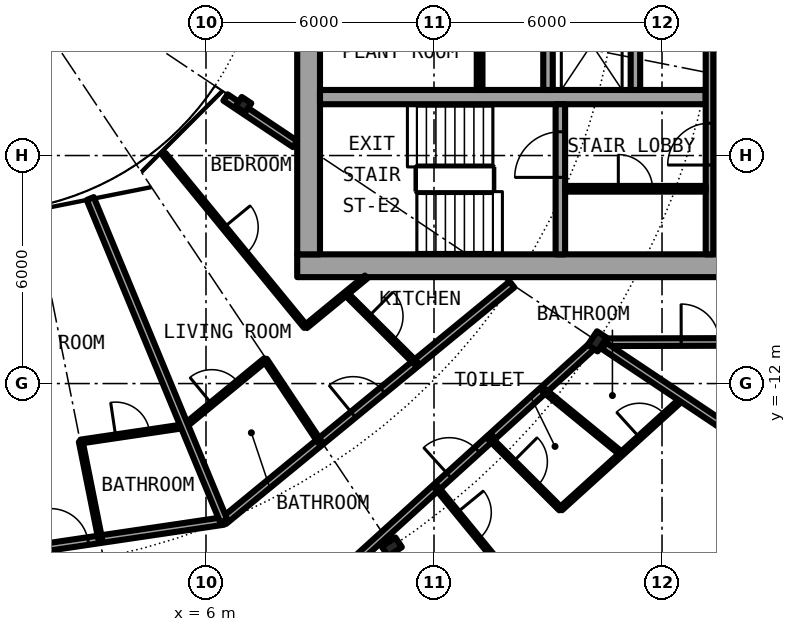
"""IFC4 building model, lengths in metres.
Left out: names, types, materials, properties, quantities, classifications, styles, units other than length and angle.
Written with IfcOpenShell. Run it as: python <this file> out.ifc"""

import sys

from ifc_helpers import new_model, si_unit, direction, frame, frame_2d, origin, origin_2d, place, context, subcontext, project, spatial, rectangle, i_section, extrude, element, fill, save


model = new_model("IFC4")
c1 = context("Model", 3, precision=1e-05, world=origin(), true_north=direction((0.0, 1.0)))
c2 = subcontext(c1, "Body", "Model", "MODEL_VIEW")
j1 = project(units=[si_unit("LENGTHUNIT", "METRE"), si_unit("PLANEANGLEUNIT", "RADIAN")], contexts=[c1])
p1 = place(None, origin())
s1 = spatial("IfcSite", under=j1, at=p1, CompositionType="ELEMENT")
p2 = place(p1, origin())
s2 = spatial("IfcBuilding", under=s1, at=p2, CompositionType="ELEMENT")
p3 = place(p2, frame((0.0, 0.0, 129.95)))
s3 = spatial("IfcBuildingStorey", under=s2, at=p3, CompositionType="ELEMENT", Elevation=129.95)
for number, where, z_axis, x_axis in (
    (1, (10.889, -16.297, 0.0), (0.0, 0.0, 1.0), (0.556, -0.831, 0.0)),
    (2, (16.297, -10.889, 0.0), (0.0, 0.0, 1.0), (0.831, -0.556, 0.0)),
):
    element("IfcColumn", number, at=place(p3, frame(where, z_axis=z_axis, x_axis=x_axis)), inside=s3, PredefinedType="COLUMN", context=c2, shape_type="SweptSolid", body=[
        extrude(i_section(OverallWidth=0.307, OverallDepth=0.432, WebThickness=0.021, FlangeThickness=0.04, FilletRadius=0.027, at=origin_2d()), origin(), (0.0, 0.0, 1.0), 3.05),
    ])
p4 = place(p3, frame((6.984, -4.667, 0.0), z_axis=(0.0, 0.0, 1.0), x_axis=(0.831469612303, -0.55557023302, 0.0)))
e3 = element("IfcColumn", 3, at=p4, inside=s3, PredefinedType="COLUMN", context=c2, shape_type="SweptSolid", body=[
    extrude(i_section(OverallWidth=0.3, OverallDepth=0.3, WebThickness=0.011, FlangeThickness=0.019, FilletRadius=0.027, at=origin_2d()), origin(), (0.0, 0.0, 1.0), 3.05),
])
p5 = place(p3, frame((19.304, -19.304, 0.0), z_axis=(0.0, 0.0, 1.0), x_axis=(0.634382322723, 0.773019449054, 0.0)))
e4 = element("IfcWall", 4, at=p5, inside=s3, PredefinedType="SOLIDWALL", context=c2, shape_type="SweptSolid", body=[
    extrude(rectangle(XDim=5.352, YDim=0.25, at=frame_2d((2.676, 0.0))), origin(), (0.0, 0.0, 1.0), 2.7),
])
p6 = place(p5, frame((0.441, 0.0, 0.3)))
e5 = element("IfcOpeningElement", 5, at=p6, cuts=e4, PredefinedType="OPENING", context=c2, shape_type="SweptSolid", body=[
    extrude(rectangle(XDim=1.8, YDim=2.1, at=frame_2d((0.9, 1.05))), frame((0.0, 0.135, 0.0), z_axis=(0.0, -1.0, 0.0), x_axis=(1.0, 0.0, 0.0)), (0.0, 0.0, 1.0), 0.27),
])
p7 = place(p5, frame((3.51, 0.0, 0.0)))
e6 = element("IfcOpeningElement", 6, at=p7, cuts=e4, PredefinedType="OPENING", context=c2, shape_type="SweptSolid", body=[
    extrude(rectangle(XDim=1.0, YDim=2.2, at=frame_2d((0.5, 1.1))), frame((0.0, 0.135, 0.0), z_axis=(0.0, -1.0, 0.0), x_axis=(1.0, 0.0, 0.0)), (0.0, 0.0, 1.0), 0.27),
])
p8 = place(p3, frame((8.4, -8.9, 0.0), z_axis=(0.0, 0.0, 1.0), x_axis=(1.0, 0.0, 0.0)))
e7 = element("IfcWall", 7, at=p8, inside=s3, PredefinedType="SHEAR", context=c2, shape_type="SweptSolid", body=[
    extrude(rectangle(XDim=13.8, YDim=0.6, at=frame_2d((6.9, 0.0))), origin(), (0.0, 0.0, 1.0), 3.05),
])
p9 = place(p8, frame((11.475, 0.0, 0.0)))
e8 = element("IfcOpeningElement", 8, at=p9, cuts=e7, PredefinedType="OPENING", context=c2, shape_type="SweptSolid", body=[
    extrude(rectangle(XDim=1.2, YDim=2.3, at=frame_2d((0.6, 1.15))), frame((0.0, 0.31, 0.0), z_axis=(0.0, -1.0, 0.0), x_axis=(1.0, 0.0, 0.0)), (0.0, 0.0, 1.0), 0.62),
])
p10 = place(p3, frame((8.7, -8.6, 0.0), z_axis=(0.0, 0.0, 1.0), x_axis=(0.0, 1.0, 0.0)))
e9 = element("IfcWall", 9, at=p10, inside=s3, PredefinedType="SHEAR", context=c2, shape_type="SweptSolid", body=[
    extrude(rectangle(XDim=17.2, YDim=0.6, at=frame_2d((8.6, 0.0))), origin(), (0.0, 0.0, 1.0), 3.05),
])
p11 = place(p10, frame((7.4, 0.0, 0.1)))
e10 = element("IfcOpeningElement", 10, at=p11, cuts=e9, PredefinedType="OPENING", context=c2, shape_type="SweptSolid", body=[
    extrude(rectangle(XDim=2.4, YDim=2.2, at=frame_2d((1.2, 1.1))), frame((0.0, 0.31, 0.0), z_axis=(0.0, -1.0, 0.0), x_axis=(1.0, 0.0, 0.0)), (0.0, 0.0, 1.0), 0.62),
])
p12 = place(p3, frame((9.0, -4.462, 0.0), z_axis=(0.0, 0.0, 1.0), x_axis=(1.0, 0.0, 0.0)))
e11 = element("IfcWall", 11, at=p12, inside=s3, PredefinedType="SHEAR", context=c2, shape_type="SweptSolid", body=[
    extrude(rectangle(XDim=10.15, YDim=0.375, at=frame_2d((5.075, 0.0))), origin(), (0.0, 0.0, 1.0), 3.05),
])
p13 = place(p3, frame((15.325, -8.6, 0.0), z_axis=(0.0, 0.0, 1.0), x_axis=(0.0, 1.0, 0.0)))
e12 = element("IfcWall", 12, at=p13, inside=s3, PredefinedType="SHEAR", context=c2, shape_type="SweptSolid", body=[
    extrude(rectangle(XDim=3.95, YDim=0.25, at=frame_2d((1.975, 0.0))), origin(), (0.0, 0.0, 1.0), 3.05),
])
p14 = place(p13, frame((2.025, 0.0, 0.0)))
e13 = element("IfcOpeningElement", 13, at=p14, cuts=e12, PredefinedType="OPENING", context=c2, shape_type="SweptSolid", body=[
    extrude(rectangle(XDim=1.2, YDim=2.3, at=frame_2d((0.6, 1.15))), frame((0.0, 0.135, 0.0), z_axis=(0.0, -1.0, 0.0), x_axis=(1.0, 0.0, 0.0)), (0.0, 0.0, 1.0), 0.27),
])
for number, where, z_axis, x_axis in (
    (14, (15.0, -1.825, 0.0), (0.0, 0.0, 1.0), (0.0, -1.0, 0.0)),
    (15, (17.3, -1.825, 0.0), (0.0, 0.0, 1.0), (0.0, -1.0, 0.0)),
):
    element("IfcWall", number, at=place(p3, frame(where, z_axis=z_axis, x_axis=x_axis)), inside=s3, PredefinedType="SOLIDWALL", context=c2, shape_type="SweptSolid", body=[
        extrude(rectangle(XDim=2.45, YDim=0.25, at=frame_2d((1.225, 0.0))), origin(), (0.0, 0.0, 1.0), 2.7),
    ])
p15 = place(p3, frame((19.25, -8.6, 0.0), z_axis=(0.0, 0.0, 1.0), x_axis=(0.0, 1.0, 0.0)))
e16 = element("IfcWall", 16, at=p15, inside=s3, PredefinedType="SOLIDWALL", context=c2, shape_type="SweptSolid", body=[
    extrude(rectangle(XDim=7.025, YDim=0.2, at=frame_2d((3.513, 0.0))), origin(), (0.0, 0.0, 1.0), 2.7),
])
p16 = place(p15, frame((2.35, 0.0, 0.0)))
e17 = element("IfcOpeningElement", 17, at=p16, cuts=e16, PredefinedType="OPENING", context=c2, shape_type="SweptSolid", body=[
    extrude(rectangle(XDim=1.1, YDim=2.3, at=frame_2d((0.55, 1.15))), frame((0.0, 0.11, 0.0), z_axis=(0.0, -1.0, 0.0), x_axis=(1.0, 0.0, 0.0)), (0.0, 0.0, 1.0), 0.22),
])
p17 = place(p3, frame((13.2, -1.825, 0.0), z_axis=(0.0, 0.0, 1.0), x_axis=(0.0, -1.0, 0.0)))
e18 = element("IfcWall", 18, at=p17, inside=s3, PredefinedType="PARTITIONING", context=c2, shape_type="SweptSolid", body=[
    extrude(rectangle(XDim=2.45, YDim=0.15, at=frame_2d((1.225, 0.0))), origin(), (0.0, 0.0, 1.0), 2.7),
])
p18 = place(p3, frame((15.45, -6.875, 0.0), z_axis=(0.0, 0.0, 1.0), x_axis=(1.0, 0.0, 0.0)))
e19 = element("IfcWall", 19, at=p18, inside=s3, PredefinedType="PARTITIONING", context=c2, shape_type="SweptSolid", body=[
    extrude(rectangle(XDim=3.7, YDim=0.15, at=frame_2d((1.85, 0.0))), origin(), (0.0, 0.0, 1.0), 2.7),
])
p19 = place(p18, frame((1.4, 0.0, 0.0)))
e20 = element("IfcOpeningElement", 20, at=p19, cuts=e19, PredefinedType="OPENING", context=c2, shape_type="SweptSolid", body=[
    extrude(rectangle(XDim=0.9, YDim=2.3, at=frame_2d((0.45, 1.15))), frame((0.0, 0.085, 0.0), z_axis=(0.0, -1.0, 0.0), x_axis=(1.0, 0.0, 0.0)), (0.0, 0.0, 1.0), 0.17),
])
p20 = place(p3, frame((15.336, -15.296, 0.0), z_axis=(0.0, 0.0, 1.0), x_axis=(0.740895789277, 0.671620003746, 0.0)))
e21 = element("IfcWall", 21, at=p20, inside=s3, PredefinedType="PARTITIONING", context=c2, shape_type="SweptSolid", body=[
    extrude(rectangle(XDim=4.331, YDim=0.1, at=frame_2d((2.166, 0.0))), origin(), (0.0, 0.0, 1.0), 2.7),
])
p21 = place(p20, frame((2.796, 0.0, 0.0)))
e22 = element("IfcOpeningElement", 22, at=p21, cuts=e21, PredefinedType="OPENING", context=c2, shape_type="SweptSolid", body=[
    extrude(rectangle(XDim=0.9, YDim=2.3, at=frame_2d((0.45, 1.15))), frame((0.0, 0.06, 0.0), z_axis=(0.0, -1.0, 0.0), x_axis=(1.0, 0.0, 0.0)), (0.0, 0.0, 1.0), 0.12),
])
p22 = place(p3, frame((9.249, -17.282, 0.0), z_axis=(0.0, 0.0, 1.0), x_axis=(0.740525495356, 0.672028266316, 0.0)))
e23 = element("IfcWall", 23, at=p22, inside=s3, PredefinedType="PARTITIONING", context=c2, shape_type="SweptSolid", body=[
    extrude(rectangle(XDim=5.753, YDim=0.2, at=frame_2d((2.876, 0.0))), origin(), (0.0, 0.0, 1.0), 2.7),
])
p23 = place(p22, frame((4.253, 0.0, 0.0)))
e24 = element("IfcOpeningElement", 24, at=p23, cuts=e23, PredefinedType="OPENING", context=c2, shape_type="SweptSolid", body=[
    extrude(rectangle(XDim=1.0, YDim=2.3, at=frame_2d((0.5, 1.15))), frame((0.0, 0.11, 0.0), z_axis=(0.0, -1.0, 0.0), x_axis=(1.0, 0.0, 0.0)), (0.0, 0.0, 1.0), 0.22),
])
p24 = place(p3, frame((13.545, -13.384, 0.0), z_axis=(0.0, 0.0, 1.0), x_axis=(0.740607766684, 0.671937598239, 0.0)))
e25 = element("IfcWall", 25, at=p24, inside=s3, PredefinedType="PARTITIONING", context=c2, shape_type="SweptSolid", body=[
    extrude(rectangle(XDim=3.555, YDim=0.2, at=frame_2d((1.778, 0.0))), origin(), (0.0, 0.0, 1.0), 2.39),
])
p25 = place(p3, frame((-1.658, -16.819, 0.0), z_axis=(0.0, 0.0, 1.0), x_axis=(0.989191327347, 0.146630549004, 0.0)))
e26 = element("IfcWall", 26, at=p25, inside=s3, PredefinedType="PARTITIONING", context=c2, shape_type="SweptSolid", body=[
    extrude(rectangle(XDim=8.212, YDim=0.2, at=frame_2d((4.106, 0.0))), origin(), (0.0, 0.0, 1.0), 2.7),
])
p26 = place(p25, frame((3.607, 0.0, 0.0)))
e27 = element("IfcOpeningElement", 27, at=p26, cuts=e26, PredefinedType="OPENING", context=c2, shape_type="SweptSolid", body=[
    extrude(rectangle(XDim=1.0, YDim=2.3, at=frame_2d((0.5, 1.15))), frame((0.0, 0.11, 0.0), z_axis=(0.0, -1.0, 0.0), x_axis=(1.0, 0.0, 0.0)), (0.0, 0.0, 1.0), 0.22),
])
p27 = place(p3, frame((6.467, -15.614, 0.0), z_axis=(0.0, 0.0, 1.0), x_axis=(0.773074935257, 0.634314704605, 0.0)))
e28 = element("IfcWall", 28, at=p27, inside=s3, PredefinedType="PARTITIONING", context=c2, shape_type="SweptSolid", body=[
    extrude(rectangle(XDim=9.809, YDim=0.2, at=frame_2d((4.904, 0.0))), origin(), (0.0, 0.0, 1.0), 2.7),
])
p28 = place(p27, frame((4.407, 0.0, 0.0)))
e29 = element("IfcOpeningElement", 29, at=p28, cuts=e28, PredefinedType="OPENING", context=c2, shape_type="SweptSolid", body=[
    extrude(rectangle(XDim=1.0, YDim=2.3, at=frame_2d((0.5, 1.15))), frame((0.0, 0.11, 0.0), z_axis=(0.0, -1.0, 0.0), x_axis=(1.0, 0.0, 0.0)), (0.0, 0.0, 1.0), 0.22),
])
p29 = place(p3, frame((2.703, -13.525, 0.0), z_axis=(0.0, 0.0, 1.0), x_axis=(0.98918730894, 0.146657655211, 0.0)))
e30 = element("IfcWall", 30, at=p29, inside=s3, PredefinedType="PARTITIONING", context=c2, shape_type="SweptSolid", body=[
    extrude(rectangle(XDim=2.76, YDim=0.1, at=frame_2d((1.38, 0.0))), origin(), (0.0, 0.0, 1.0), 2.7),
])
p30 = place(p29, frame((0.931, 0.0, 0.0)))
e31 = element("IfcOpeningElement", 31, at=p30, cuts=e30, PredefinedType="OPENING", context=c2, shape_type="SweptSolid", body=[
    extrude(rectangle(XDim=0.9, YDim=2.3, at=frame_2d((0.45, 1.15))), frame((0.0, 0.06, 0.0), z_axis=(0.0, -1.0, 0.0), x_axis=(1.0, 0.0, 0.0)), (0.0, 0.0, 1.0), 0.12),
])
p31 = place(p3, frame((5.44, -13.117, 0.0), z_axis=(0.0, 0.0, 1.0), x_axis=(0.772732480827, 0.634731843439, 0.0)))
e32 = element("IfcWall", 32, at=p31, inside=s3, PredefinedType="PARTITIONING", context=c2, shape_type="SweptSolid", body=[
    extrude(rectangle(XDim=2.748, YDim=0.1, at=frame_2d((1.374, 0.0))), origin(), (0.0, 0.0, 1.0), 2.7),
])
p32 = place(p31, frame((0.918, 0.0, 0.0)))
e33 = element("IfcOpeningElement", 33, at=p32, cuts=e32, PredefinedType="OPENING", context=c2, shape_type="SweptSolid", body=[
    extrude(rectangle(XDim=0.9, YDim=2.3, at=frame_2d((0.45, 1.15))), frame((0.0, 0.06, 0.0), z_axis=(0.0, -1.0, 0.0), x_axis=(1.0, 0.0, 0.0)), (0.0, 0.0, 1.0), 0.12),
])
p33 = place(p3, frame((8.625, -10.501, 0.0), z_axis=(0.0, 0.0, 1.0), x_axis=(0.772817828959, 0.634627925042, 0.0)))
e34 = element("IfcWall", 34, at=p33, inside=s3, PredefinedType="PARTITIONING", context=c2, shape_type="SweptSolid", body=[
    extrude(rectangle(XDim=2.055, YDim=0.1, at=frame_2d((1.027, 0.0))), origin(), (0.0, 0.0, 1.0), 2.7),
])
p34 = place(p3, frame((16.54, -10.913, 0.0), z_axis=(0.0, 0.0, 1.0), x_axis=(0.99999670426, 0.002567385634, 0.0)))
e35 = element("IfcWall", 35, at=p34, inside=s3, PredefinedType="PARTITIONING", context=c2, shape_type="SweptSolid", body=[
    extrude(rectangle(XDim=5.135, YDim=0.2, at=frame_2d((2.567, 0.0))), origin(), (0.0, 0.0, 1.0), 2.7),
])
p35 = place(p34, frame((1.965, 0.0, 0.0)))
e36 = element("IfcOpeningElement", 36, at=p35, cuts=e35, PredefinedType="OPENING", context=c2, shape_type="SweptSolid", body=[
    extrude(rectangle(XDim=1.0, YDim=2.3, at=frame_2d((0.5, 1.15))), frame((0.0, 0.11, 0.0), z_axis=(0.0, -1.0, 0.0), x_axis=(1.0, 0.0, 0.0)), (0.0, 0.0, 1.0), 0.22),
])
p36 = place(p3, frame((6.513, -4.472, 0.0), z_axis=(0.0, 0.0, 1.0), x_axis=(0.831333375071, -0.555774072347, 0.0)))
e37 = element("IfcWall", 37, at=p36, inside=s3, PredefinedType="PARTITIONING", context=c2, shape_type="SweptSolid", body=[
    extrude(rectangle(XDim=2.203, YDim=0.2, at=frame_2d((1.101, 0.0))), origin(), (0.0, 0.0, 1.0), 2.7),
])
p37 = place(p3, frame((2.704, -13.524, 0.0), z_axis=(0.0, 0.0, 1.0), x_axis=(0.195937128464, -0.980616460034, 0.0)))
e38 = element("IfcWall", 38, at=p37, inside=s3, PredefinedType="PARTITIONING", context=c2, shape_type="SweptSolid", body=[
    extrude(rectangle(XDim=2.623, YDim=0.1, at=frame_2d((1.312, 0.0))), origin(), (0.0, 0.0, 1.0), 2.7),
])
p38 = place(p3, frame((2.954, -7.132, 0.0), z_axis=(0.0, 0.0, 1.0), x_axis=(0.382646942224, -0.923894646378, 0.0)))
e39 = element("IfcWall", 39, at=p38, inside=s3, PredefinedType="PARTITIONING", context=c2, shape_type="SweptSolid", body=[
    extrude(rectangle(XDim=9.181, YDim=0.2, at=frame_2d((4.59, 0.0))), origin(), (0.0, 0.0, 1.0), 2.7),
])
p39 = place(p3, frame((4.898, -5.968, 0.0), z_axis=(0.0, 0.0, 1.0), x_axis=(0.634358693064, -0.773038840249, 0.0)))
e40 = element("IfcWall", 40, at=p39, inside=s3, PredefinedType="PARTITIONING", context=c2, shape_type="SweptSolid", body=[
    extrude(rectangle(XDim=5.868, YDim=0.1, at=frame_2d((2.934, 0.0))), origin(), (0.0, 0.0, 1.0), 2.7),
])
p40 = place(p39, frame((2.484, 0.0, 0.0)))
e41 = element("IfcOpeningElement", 41, at=p40, cuts=e40, PredefinedType="OPENING", context=c2, shape_type="SweptSolid", body=[
    extrude(rectangle(XDim=0.9, YDim=2.3, at=frame_2d((0.45, 1.15))), frame((0.0, 0.06, 0.0), z_axis=(0.0, -1.0, 0.0), x_axis=(1.0, 0.0, 0.0)), (0.0, 0.0, 1.0), 0.12),
])
p41 = place(p3, frame((7.558, -11.376, 0.0), z_axis=(0.0, 0.0, 1.0), x_axis=(0.553615197403, -0.83277260594, 0.0)))
e42 = element("IfcWall", 42, at=p41, inside=s3, PredefinedType="PARTITIONING", context=c2, shape_type="SweptSolid", body=[
    extrude(rectangle(XDim=2.597, YDim=0.1, at=frame_2d((1.299, 0.0))), origin(), (0.0, 0.0, 1.0), 2.7),
])
p42 = place(p3, frame((9.683, -9.632, 0.0), z_axis=(0.0, 0.0, 1.0), x_axis=(0.708796844581, -0.705412668665, 0.0)))
e43 = element("IfcWall", 43, at=p42, inside=s3, PredefinedType="PARTITIONING", context=c2, shape_type="SweptSolid", body=[
    extrude(rectangle(XDim=2.597, YDim=0.1, at=frame_2d((1.299, 0.0))), origin(), (0.0, 0.0, 1.0), 2.7),
])
p43 = place(p42, frame((0.849, 0.0, 0.0)))
e44 = element("IfcOpeningElement", 44, at=p43, cuts=e43, PredefinedType="OPENING", context=c2, shape_type="SweptSolid", body=[
    extrude(rectangle(XDim=0.9, YDim=2.3, at=frame_2d((0.45, 1.15))), frame((0.0, 0.06, 0.0), z_axis=(0.0, -1.0, 0.0), x_axis=(1.0, 0.0, 0.0)), (0.0, 0.0, 1.0), 0.12),
])
p44 = place(p3, frame((12.062, -14.727, 0.0), z_axis=(0.0, 0.0, 1.0), x_axis=(0.633664062855, -0.773608334654, 0.0)))
e45 = element("IfcWall", 45, at=p44, inside=s3, PredefinedType="PARTITIONING", context=c2, shape_type="SweptSolid", body=[
    extrude(rectangle(XDim=8.138, YDim=0.1, at=frame_2d((4.069, 0.0))), origin(), (0.0, 0.0, 1.0), 2.7),
])
p45 = place(p44, frame((0.861, 0.0, 0.0)))
e46 = element("IfcOpeningElement", 46, at=p45, cuts=e45, PredefinedType="OPENING", context=c2, shape_type="SweptSolid", body=[
    extrude(rectangle(XDim=0.9, YDim=2.3, at=frame_2d((0.45, 1.15))), frame((0.0, 0.06, 0.0), z_axis=(0.0, -1.0, 0.0), x_axis=(1.0, 0.0, 0.0)), (0.0, 0.0, 1.0), 0.12),
])
p46 = place(p44, frame((4.931, 0.0, 0.0)))
e47 = element("IfcOpeningElement", 47, at=p46, cuts=e45, PredefinedType="OPENING", context=c2, shape_type="SweptSolid", body=[
    extrude(rectangle(XDim=0.9, YDim=2.3, at=frame_2d((0.45, 1.15))), frame((0.0, 0.06, 0.0), z_axis=(0.0, -1.0, 0.0), x_axis=(1.0, 0.0, 0.0)), (0.0, 0.0, 1.0), 0.12),
])
p47 = place(p3, frame((13.474, -13.448, 0.0), z_axis=(0.0, 0.0, 1.0), x_axis=(0.707851299421, -0.706361478217, 0.0)))
e48 = element("IfcWall", 48, at=p47, inside=s3, PredefinedType="PARTITIONING", context=c2, shape_type="SweptSolid", body=[
    extrude(rectangle(XDim=2.622, YDim=0.1, at=frame_2d((1.311, 0.0))), origin(), (0.0, 0.0, 1.0), 2.7),
])
p48 = place(p47, frame((0.861, 0.0, 0.0)))
e49 = element("IfcOpeningElement", 49, at=p48, cuts=e48, PredefinedType="OPENING", context=c2, shape_type="SweptSolid", body=[
    extrude(rectangle(XDim=0.9, YDim=2.3, at=frame_2d((0.45, 1.15))), frame((0.0, 0.06, 0.0), z_axis=(0.0, -1.0, 0.0), x_axis=(1.0, 0.0, 0.0)), (0.0, 0.0, 1.0), 0.12),
])
p49 = place(p3, frame((14.882, -12.171, 0.0), z_axis=(0.0, 0.0, 1.0), x_axis=(0.774162545943, -0.632986850147, 0.0)))
e50 = element("IfcWall", 50, at=p49, inside=s3, PredefinedType="PARTITIONING", context=c2, shape_type="SweptSolid", body=[
    extrude(rectangle(XDim=2.649, YDim=0.1, at=frame_2d((1.325, 0.0))), origin(), (0.0, 0.0, 1.0), 2.7),
])
p50 = place(p3, frame((16.477, -11.009, 0.0), z_axis=(0.0, 0.0, 1.0), x_axis=(0.831467903109, -0.555572791, 0.0)))
e51 = element("IfcWall", 51, at=p50, inside=s3, PredefinedType="PARTITIONING", context=c2, shape_type="SweptSolid", body=[
    extrude(rectangle(XDim=7.358, YDim=0.2, at=frame_2d((3.679, 0.0))), origin(), (0.0, 0.0, 1.0), 2.7),
])
p51 = place(p19, origin())
e52 = element("IfcDoor", 52, at=p51, inside=s3, OperationType="SINGLE_SWING_LEFT", PredefinedType="DOOR", context=c2, shape_type="SweptSolid", body=[
    extrude(rectangle(XDim=0.9, YDim=2.3, at=frame_2d((0.45, 1.15))), frame((0.0, 0.025, 0.0), z_axis=(0.0, -1.0, 0.0), x_axis=(1.0, 0.0, 0.0)), (0.0, 0.0, 1.0), 0.05),
])
fill(e20, e52)
p52 = place(p14, origin())
e53 = element("IfcDoor", 53, at=p52, inside=s3, OperationType="SINGLE_SWING_LEFT", PredefinedType="DOOR", context=c2, shape_type="SweptSolid", body=[
    extrude(rectangle(XDim=1.2, YDim=2.3, at=frame_2d((0.6, 1.15))), frame((0.0, 0.025, 0.0), z_axis=(0.0, -1.0, 0.0), x_axis=(1.0, 0.0, 0.0)), (0.0, 0.0, 1.0), 0.05),
])
fill(e13, e53)
p53 = place(p16, origin())
e54 = element("IfcDoor", 54, at=p53, inside=s3, OperationType="SINGLE_SWING_RIGHT", PredefinedType="DOOR", context=c2, shape_type="SweptSolid", body=[
    extrude(rectangle(XDim=1.1, YDim=2.3, at=frame_2d((0.55, 1.15))), frame((0.0, 0.025, 0.0), z_axis=(0.0, -1.0, 0.0), x_axis=(1.0, 0.0, 0.0)), (0.0, 0.0, 1.0), 0.05),
])
fill(e17, e54)
p54 = place(p23, origin())
e55 = element("IfcDoor", 55, at=p54, inside=s3, OperationType="SINGLE_SWING_RIGHT", PredefinedType="DOOR", context=c2, shape_type="SweptSolid", body=[
    extrude(rectangle(XDim=1.0, YDim=2.3, at=frame_2d((0.5, 1.15))), frame((0.0, 0.025, 0.0), z_axis=(0.0, -1.0, 0.0), x_axis=(1.0, 0.0, 0.0)), (0.0, 0.0, 1.0), 0.05),
])
fill(e24, e55)
p55 = place(p21, origin())
e56 = element("IfcDoor", 56, at=p55, inside=s3, OperationType="SINGLE_SWING_RIGHT", PredefinedType="DOOR", context=c2, shape_type="SweptSolid", body=[
    extrude(rectangle(XDim=0.9, YDim=2.3, at=frame_2d((0.45, 1.15))), frame((0.0, 0.025, 0.0), z_axis=(0.0, -1.0, 0.0), x_axis=(1.0, 0.0, 0.0)), (0.0, 0.0, 1.0), 0.05),
])
fill(e22, e56)
p56 = place(p48, origin())
e57 = element("IfcDoor", 57, at=p56, inside=s3, OperationType="SINGLE_SWING_LEFT", PredefinedType="DOOR", context=c2, shape_type="SweptSolid", body=[
    extrude(rectangle(XDim=0.9, YDim=2.3, at=frame_2d((0.45, 1.15))), frame((0.0, 0.025, 0.0), z_axis=(0.0, -1.0, 0.0), x_axis=(1.0, 0.0, 0.0)), (0.0, 0.0, 1.0), 0.05),
])
fill(e49, e57)
p57 = place(p45, origin())
e58 = element("IfcDoor", 58, at=p57, inside=s3, OperationType="SINGLE_SWING_LEFT", PredefinedType="DOOR", context=c2, shape_type="SweptSolid", body=[
    extrude(rectangle(XDim=0.9, YDim=2.3, at=frame_2d((0.45, 1.15))), frame((0.0, 0.025, 0.0), z_axis=(0.0, -1.0, 0.0), x_axis=(1.0, 0.0, 0.0)), (0.0, 0.0, 1.0), 0.05),
])
fill(e46, e58)
p58 = place(p26, origin())
e59 = element("IfcDoor", 59, at=p58, inside=s3, OperationType="SINGLE_SWING_RIGHT", PredefinedType="DOOR", context=c2, shape_type="SweptSolid", body=[
    extrude(rectangle(XDim=1.0, YDim=2.3, at=frame_2d((0.5, 1.15))), frame((0.0, 0.025, 0.0), z_axis=(0.0, -1.0, 0.0), x_axis=(1.0, 0.0, 0.0)), (0.0, 0.0, 1.0), 0.05),
])
fill(e27, e59)
p59 = place(p30, origin())
e60 = element("IfcDoor", 60, at=p59, inside=s3, OperationType="SINGLE_SWING_RIGHT", PredefinedType="DOOR", context=c2, shape_type="SweptSolid", body=[
    extrude(rectangle(XDim=0.9, YDim=2.3, at=frame_2d((0.45, 1.15))), frame((0.0, 0.025, 0.0), z_axis=(0.0, -1.0, 0.0), x_axis=(1.0, 0.0, 0.0)), (0.0, 0.0, 1.0), 0.05),
])
fill(e31, e60)
p60 = place(p28, origin())
e61 = element("IfcDoor", 61, at=p60, inside=s3, OperationType="SINGLE_SWING_RIGHT", PredefinedType="DOOR", context=c2, shape_type="SweptSolid", body=[
    extrude(rectangle(XDim=1.0, YDim=2.3, at=frame_2d((0.5, 1.15))), frame((0.0, 0.025, 0.0), z_axis=(0.0, -1.0, 0.0), x_axis=(1.0, 0.0, 0.0)), (0.0, 0.0, 1.0), 0.05),
])
fill(e29, e61)
p61 = place(p32, origin())
e62 = element("IfcDoor", 62, at=p61, inside=s3, OperationType="SINGLE_SWING_LEFT", PredefinedType="DOOR", context=c2, shape_type="SweptSolid", body=[
    extrude(rectangle(XDim=0.9, YDim=2.3, at=frame_2d((0.45, 1.15))), frame((0.0, 0.025, 0.0), z_axis=(0.0, -1.0, 0.0), x_axis=(1.0, 0.0, 0.0)), (0.0, 0.0, 1.0), 0.05),
])
fill(e33, e62)
p62 = place(p43, origin())
e63 = element("IfcDoor", 63, at=p62, inside=s3, OperationType="SINGLE_SWING_RIGHT", PredefinedType="DOOR", context=c2, shape_type="SweptSolid", body=[
    extrude(rectangle(XDim=0.9, YDim=2.3, at=frame_2d((0.45, 1.15))), frame((0.0, 0.025, 0.0), z_axis=(0.0, -1.0, 0.0), x_axis=(1.0, 0.0, 0.0)), (0.0, 0.0, 1.0), 0.05),
])
fill(e44, e63)
p63 = place(p40, origin())
e64 = element("IfcDoor", 64, at=p63, inside=s3, OperationType="SINGLE_SWING_LEFT", PredefinedType="DOOR", context=c2, shape_type="SweptSolid", body=[
    extrude(rectangle(XDim=0.9, YDim=2.3, at=frame_2d((0.45, 1.15))), frame((0.0, 0.025, 0.0), z_axis=(0.0, -1.0, 0.0), x_axis=(1.0, 0.0, 0.0)), (0.0, 0.0, 1.0), 0.05),
])
fill(e41, e64)
p64 = place(p35, origin())
e65 = element("IfcDoor", 65, at=p64, inside=s3, OperationType="SINGLE_SWING_LEFT", PredefinedType="DOOR", context=c2, shape_type="SweptSolid", body=[
    extrude(rectangle(XDim=1.0, YDim=2.3, at=frame_2d((0.5, 1.15))), frame((0.0, 0.025, 0.0), z_axis=(0.0, -1.0, 0.0), x_axis=(1.0, 0.0, 0.0)), (0.0, 0.0, 1.0), 0.05),
])
fill(e36, e65)
save(model, sys.argv[1])
